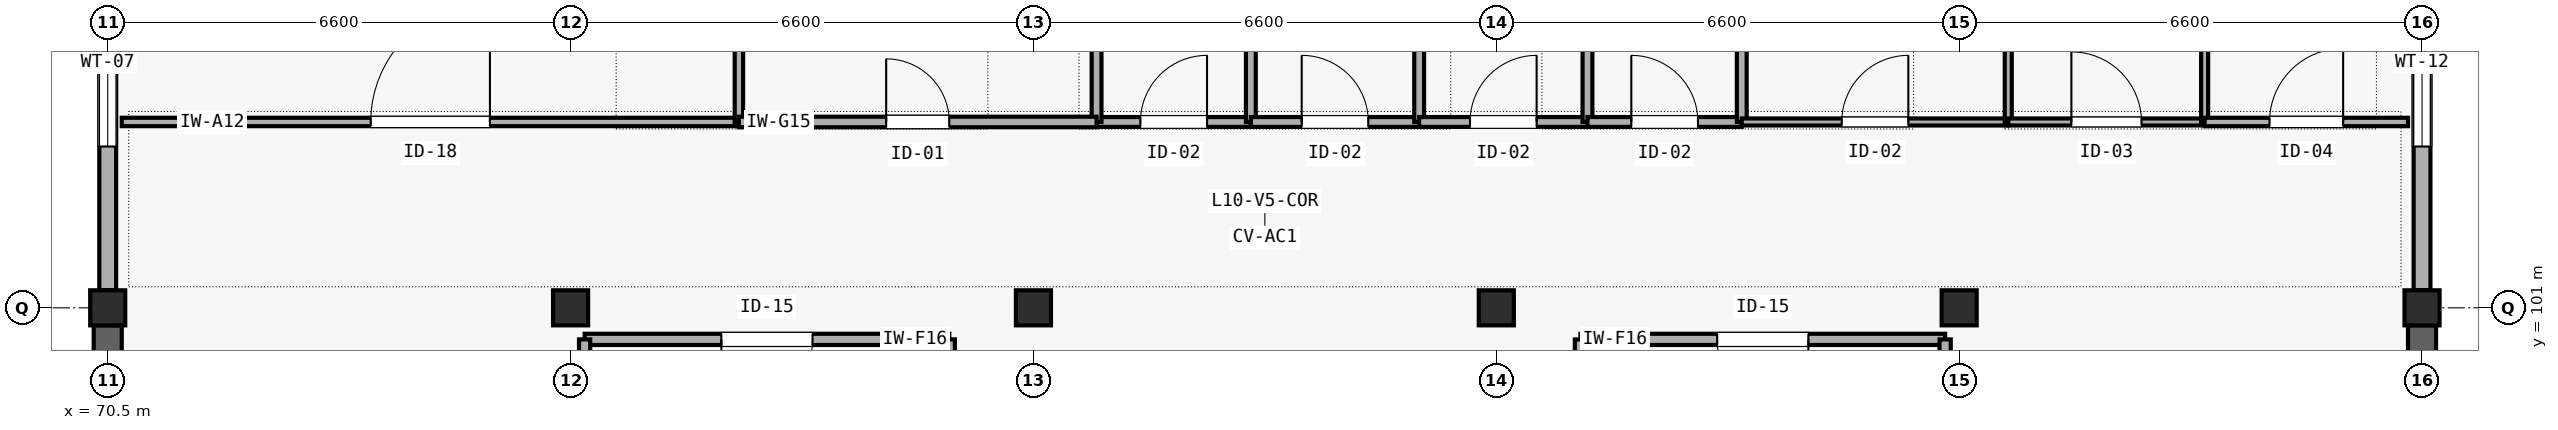
"""IFC4 building model, lengths in metres.
Left out: names, types, materials, properties, quantities, classifications, styles, units other than length and angle.
Written with IfcOpenShell. Run it as: python <this file> out.ifc"""

import sys

from ifc_helpers import new_model, si_unit, direction, frame, frame_2d, origin, origin_2d, place, context, subcontext, project, spatial, rectangle, extrude, element, fill, save


model = new_model("IFC4")
c1 = context("Model", 3, precision=1e-05, world=origin(), true_north=direction((0.0, 1.0)))
c2 = subcontext(c1, "Body", "Model", "MODEL_VIEW")
j1 = project(units=[si_unit("LENGTHUNIT", "METRE"), si_unit("PLANEANGLEUNIT", "RADIAN")], contexts=[c1])
p1 = place(None, origin())
s1 = spatial("IfcSite", under=j1, at=p1, CompositionType="ELEMENT")
p2 = place(p1, origin())
s2 = spatial("IfcBuilding", under=s1, at=p2, CompositionType="ELEMENT")
p3 = place(p2, frame((0.0, 0.0, 42.0)))
s3 = spatial("IfcBuildingStorey", under=s2, at=p3, CompositionType="ELEMENT", Elevation=42.0)
for number, where, z_axis, x_axis in (
    (1, (70.5, 101.0, 0.0), (0.0, 0.0, 1.0), (1.0, 0.0, 0.0)),
    (2, (77.1, 101.0, 0.0), (0.0, 0.0, 1.0), (1.0, 0.0, 0.0)),
    (3, (83.7, 101.0, 0.0), (0.0, 0.0, 1.0), (1.0, 0.0, 0.0)),
    (4, (90.3, 101.0, 0.0), (0.0, 0.0, 1.0), (1.0, 0.0, 0.0)),
    (5, (96.9, 101.0, 0.0), (0.0, 0.0, 1.0), (1.0, 0.0, 0.0)),
    (6, (103.5, 101.0, 0.0), (0.0, 0.0, 1.0), (1.0, 0.0, 0.0)),
):
    element("IfcColumn", number, at=place(p3, frame(where, z_axis=z_axis, x_axis=x_axis)), inside=s3, PredefinedType="COLUMN", context=c2, shape_type="SweptSolid", body=[
        extrude(rectangle(XDim=0.5, YDim=0.5, at=origin_2d()), origin(), (0.0, 0.0, 1.0), 4.2),
    ])
p4 = place(p3, frame((70.5, 97.96, 0.0), z_axis=(0.0, 0.0, 1.0), x_axis=(0.0, 1.0, 0.0)))
e7 = element("IfcWall", 7, at=p4, inside=s3, PredefinedType="SHEAR", context=c2, shape_type="SweptSolid", body=[
    extrude(rectangle(XDim=2.79, YDim=0.4, at=frame_2d((1.395, 0.0))), origin(), (0.0, 0.0, 1.0), 3.85),
])
p5 = place(p3, frame((70.5, 101.25, 0.0), z_axis=(0.0, 0.0, 1.0), x_axis=(0.0, 1.0, 0.0)))
e8 = element("IfcWall", 8, at=p5, inside=s3, PredefinedType="SOLIDWALL", context=c2, shape_type="SweptSolid", body=[
    extrude(rectangle(XDim=6.5, YDim=0.24, at=frame_2d((3.25, 0.0))), origin(), (0.0, 0.0, 1.0), 3.565),
])
p6 = place(p5, frame((2.05, 0.0, 0.85)))
e9 = element("IfcOpeningElement", 9, at=p6, cuts=e8, PredefinedType="OPENING", context=c2, shape_type="SweptSolid", body=[
    extrude(rectangle(XDim=2.4, YDim=1.35, at=frame_2d((1.2, 0.675))), frame((0.0, 0.13, 0.0), z_axis=(0.0, -1.0, 0.0), x_axis=(1.0, 0.0, 0.0)), (0.0, 0.0, 1.0), 0.26),
])
p7 = place(p3, frame((103.5, 97.96, 0.0), z_axis=(0.0, 0.0, 1.0), x_axis=(0.0, 1.0, 0.0)))
e10 = element("IfcWall", 10, at=p7, inside=s3, PredefinedType="SHEAR", context=c2, shape_type="SweptSolid", body=[
    extrude(rectangle(XDim=2.79, YDim=0.4, at=frame_2d((1.395, 0.0))), origin(), (0.0, 0.0, 1.0), 3.85),
])
p8 = place(p3, frame((103.5, 101.25, 0.0), z_axis=(0.0, 0.0, 1.0), x_axis=(0.0, 1.0, 0.0)))
e11 = element("IfcWall", 11, at=p8, inside=s3, PredefinedType="SOLIDWALL", context=c2, shape_type="SweptSolid", body=[
    extrude(rectangle(XDim=6.5, YDim=0.24, at=frame_2d((3.25, 0.0))), origin(), (0.0, 0.0, 1.0), 3.505),
])
p9 = place(p8, frame((2.05, 0.0, 0.85)))
e12 = element("IfcOpeningElement", 12, at=p9, cuts=e11, PredefinedType="OPENING", context=c2, shape_type="SweptSolid", body=[
    extrude(rectangle(XDim=2.4, YDim=1.5, at=frame_2d((1.2, 0.75))), frame((0.0, 0.13, 0.0), z_axis=(0.0, -1.0, 0.0), x_axis=(1.0, 0.0, 0.0)), (0.0, 0.0, 1.0), 0.26),
])
p10 = place(p3, frame((77.3, 100.55, 0.0), z_axis=(0.0, 0.0, 1.0), x_axis=(1.0, 0.0, 0.0)))
e13 = element("IfcWall", 13, at=p10, inside=s3, PredefinedType="SOLIDWALL", context=c2, shape_type="SweptSolid", body=[
    extrude(rectangle(XDim=5.2, YDim=0.16, at=frame_2d((2.6, 0.0))), origin(), (0.0, 0.0, 1.0), 3.9),
])
p11 = place(p10, frame((1.95, 0.0, 0.0)))
e14 = element("IfcOpeningElement", 14, at=p11, cuts=e13, PredefinedType="OPENING", context=c2, shape_type="SweptSolid", body=[
    extrude(rectangle(XDim=1.3, YDim=2.15, at=frame_2d((0.65, 1.075))), frame((0.0, 0.09, 0.0), z_axis=(0.0, -1.0, 0.0), x_axis=(1.0, 0.0, 0.0)), (0.0, 0.0, 1.0), 0.18),
])
p12 = place(p3, frame((77.3, 97.5, 0.0), z_axis=(0.0, 0.0, 1.0), x_axis=(0.0, 1.0, 0.0)))
e15 = element("IfcWall", 15, at=p12, inside=s3, PredefinedType="SOLIDWALL", context=c2, shape_type="SweptSolid", body=[
    extrude(rectangle(XDim=3.05, YDim=0.16, at=frame_2d((1.525, 0.0))), origin(), (0.0, 0.0, 1.0), 3.405),
])
p13 = place(p3, frame((82.5, 97.5, 0.0), z_axis=(0.0, 0.0, 1.0), x_axis=(0.0, 1.0, 0.0)))
e16 = element("IfcWall", 16, at=p13, inside=s3, PredefinedType="SOLIDWALL", context=c2, shape_type="SweptSolid", body=[
    extrude(rectangle(XDim=3.05, YDim=0.16, at=frame_2d((1.525, 0.0))), origin(), (0.0, 0.0, 1.0), 3.9),
])
p14 = place(p3, frame((91.5, 100.55, 0.0), z_axis=(0.0, 0.0, 1.0), x_axis=(1.0, 0.0, 0.0)))
e17 = element("IfcWall", 17, at=p14, inside=s3, PredefinedType="SOLIDWALL", context=c2, shape_type="SweptSolid", body=[
    extrude(rectangle(XDim=5.2, YDim=0.16, at=frame_2d((2.6, 0.0))), origin(), (0.0, 0.0, 1.0), 3.9),
])
p15 = place(p14, frame((1.95, 0.0, 0.0)))
e18 = element("IfcOpeningElement", 18, at=p15, cuts=e17, PredefinedType="OPENING", context=c2, shape_type="SweptSolid", body=[
    extrude(rectangle(XDim=1.3, YDim=2.15, at=frame_2d((0.65, 1.075))), frame((0.0, 0.09, 0.0), z_axis=(0.0, -1.0, 0.0), x_axis=(1.0, 0.0, 0.0)), (0.0, 0.0, 1.0), 0.18),
])
p16 = place(p3, frame((91.5, 97.5, 0.0), z_axis=(0.0, 0.0, 1.0), x_axis=(0.0, 1.0, 0.0)))
e19 = element("IfcWall", 19, at=p16, inside=s3, PredefinedType="SOLIDWALL", context=c2, shape_type="SweptSolid", body=[
    extrude(rectangle(XDim=3.05, YDim=0.16, at=frame_2d((1.525, 0.0))), origin(), (0.0, 0.0, 1.0), 3.9),
])
p17 = place(p3, frame((96.7, 97.5, 0.0), z_axis=(0.0, 0.0, 1.0), x_axis=(0.0, 1.0, 0.0)))
e20 = element("IfcWall", 20, at=p17, inside=s3, PredefinedType="SOLIDWALL", context=c2, shape_type="SweptSolid", body=[
    extrude(rectangle(XDim=3.05, YDim=0.16, at=frame_2d((1.525, 0.0))), origin(), (0.0, 0.0, 1.0), 3.405),
])
p18 = place(p3, frame((84.6, 103.65, 0.0), z_axis=(0.0, 0.0, 1.0), x_axis=(1.0, 0.0, 0.0)))
e21 = element("IfcWall", 21, at=p18, inside=s3, PredefinedType="PLUMBINGWALL", context=c2, shape_type="SweptSolid", body=[
    extrude(rectangle(XDim=2.2, YDim=0.14, at=frame_2d((1.1, 0.0))), origin(), (0.0, 0.0, 1.0), 3.9),
])
p19 = place(p18, frame((0.625, 0.0, 0.0)))
e22 = element("IfcOpeningElement", 22, at=p19, cuts=e21, PredefinedType="OPENING", context=c2, shape_type="SweptSolid", body=[
    extrude(rectangle(XDim=0.95, YDim=2.1, at=frame_2d((0.475, 1.05))), frame((0.0, 0.08, 0.0), z_axis=(0.0, -1.0, 0.0), x_axis=(1.0, 0.0, 0.0)), (0.0, 0.0, 1.0), 0.16),
])
for number, where, z_axis, x_axis in (
    (23, (84.6, 103.65, 0.0), (0.0, 0.0, 1.0), (0.0, 1.0, 0.0)),
    (24, (86.8, 103.65, 0.0), (0.0, 0.0, 1.0), (0.0, 1.0, 0.0)),
):
    element("IfcWall", number, at=place(p3, frame(where, z_axis=z_axis, x_axis=x_axis)), inside=s3, PredefinedType="PLUMBINGWALL", context=c2, shape_type="SweptSolid", body=[
        extrude(rectangle(XDim=4.15, YDim=0.14, at=frame_2d((2.075, 0.0))), origin(), (0.0, 0.0, 1.0), 3.9),
    ])
p20 = place(p3, frame((86.8, 103.65, 0.0), z_axis=(0.0, 0.0, 1.0), x_axis=(1.0, 0.0, 0.0)))
e25 = element("IfcWall", 25, at=p20, inside=s3, PredefinedType="PLUMBINGWALL", context=c2, shape_type="SweptSolid", body=[
    extrude(rectangle(XDim=2.4, YDim=0.14, at=frame_2d((1.2, 0.0))), origin(), (0.0, 0.0, 1.0), 3.9),
])
p21 = place(p20, frame((0.725, 0.0, 0.0)))
e26 = element("IfcOpeningElement", 26, at=p21, cuts=e25, PredefinedType="OPENING", context=c2, shape_type="SweptSolid", body=[
    extrude(rectangle(XDim=0.95, YDim=2.1, at=frame_2d((0.475, 1.05))), frame((0.0, 0.08, 0.0), z_axis=(0.0, -1.0, 0.0), x_axis=(1.0, 0.0, 0.0)), (0.0, 0.0, 1.0), 0.16),
])
p22 = place(p3, frame((89.2, 103.65, 0.0), z_axis=(0.0, 0.0, 1.0), x_axis=(0.0, 1.0, 0.0)))
e27 = element("IfcWall", 27, at=p22, inside=s3, PredefinedType="PLUMBINGWALL", context=c2, shape_type="SweptSolid", body=[
    extrude(rectangle(XDim=4.15, YDim=0.14, at=frame_2d((2.075, 0.0))), origin(), (0.0, 0.0, 1.0), 3.9),
])
p23 = place(p3, frame((89.2, 103.65, 0.0), z_axis=(0.0, 0.0, 1.0), x_axis=(1.0, 0.0, 0.0)))
e28 = element("IfcWall", 28, at=p23, inside=s3, PredefinedType="PLUMBINGWALL", context=c2, shape_type="SweptSolid", body=[
    extrude(rectangle(XDim=2.4, YDim=0.14, at=frame_2d((1.2, 0.0))), origin(), (0.0, 0.0, 1.0), 3.9),
])
p24 = place(p23, frame((0.725, 0.0, 0.0)))
e29 = element("IfcOpeningElement", 29, at=p24, cuts=e28, PredefinedType="OPENING", context=c2, shape_type="SweptSolid", body=[
    extrude(rectangle(XDim=0.95, YDim=2.1, at=frame_2d((0.475, 1.05))), frame((0.0, 0.08, 0.0), z_axis=(0.0, -1.0, 0.0), x_axis=(1.0, 0.0, 0.0)), (0.0, 0.0, 1.0), 0.16),
])
p25 = place(p3, frame((91.6, 103.65, 0.0), z_axis=(0.0, 0.0, 1.0), x_axis=(0.0, 1.0, 0.0)))
e30 = element("IfcWall", 30, at=p25, inside=s3, PredefinedType="PLUMBINGWALL", context=c2, shape_type="SweptSolid", body=[
    extrude(rectangle(XDim=4.15, YDim=0.14, at=frame_2d((2.075, 0.0))), origin(), (0.0, 0.0, 1.0), 3.9),
])
p26 = place(p3, frame((91.6, 103.65, 0.0), z_axis=(0.0, 0.0, 1.0), x_axis=(1.0, 0.0, 0.0)))
e31 = element("IfcWall", 31, at=p26, inside=s3, PredefinedType="PLUMBINGWALL", context=c2, shape_type="SweptSolid", body=[
    extrude(rectangle(XDim=2.2, YDim=0.14, at=frame_2d((1.1, 0.0))), origin(), (0.0, 0.0, 1.0), 3.9),
])
p27 = place(p26, frame((0.625, 0.0, 0.0)))
e32 = element("IfcOpeningElement", 32, at=p27, cuts=e31, PredefinedType="OPENING", context=c2, shape_type="SweptSolid", body=[
    extrude(rectangle(XDim=0.95, YDim=2.1, at=frame_2d((0.475, 1.05))), frame((0.0, 0.08, 0.0), z_axis=(0.0, -1.0, 0.0), x_axis=(1.0, 0.0, 0.0)), (0.0, 0.0, 1.0), 0.16),
])
p28 = place(p3, frame((93.8, 103.65, 0.0), z_axis=(0.0, 0.0, 1.0), x_axis=(0.0, 1.0, 0.0)))
e33 = element("IfcWall", 33, at=p28, inside=s3, PredefinedType="PLUMBINGWALL", context=c2, shape_type="SweptSolid", body=[
    extrude(rectangle(XDim=4.15, YDim=0.14, at=frame_2d((2.075, 0.0))), origin(), (0.0, 0.0, 1.0), 3.9),
])
p29 = place(p3, frame((70.7, 103.65, 0.0), z_axis=(0.0, 0.0, 1.0), x_axis=(1.0, 0.0, 0.0)))
e34 = element("IfcWall", 34, at=p29, inside=s3, PredefinedType="PARTITIONING", context=c2, shape_type="SweptSolid", body=[
    extrude(rectangle(XDim=8.8, YDim=0.12, at=frame_2d((4.4, 0.0))), origin(), (0.0, 0.0, 1.0), 3.9),
])
p30 = place(p29, frame((3.55, 0.0, 0.0)))
e35 = element("IfcOpeningElement", 35, at=p30, cuts=e34, PredefinedType="OPENING", context=c2, shape_type="SweptSolid", body=[
    extrude(rectangle(XDim=1.7, YDim=2.2, at=frame_2d((0.85, 1.1))), frame((0.0, 0.07, 0.0), z_axis=(0.0, -1.0, 0.0), x_axis=(1.0, 0.0, 0.0)), (0.0, 0.0, 1.0), 0.14),
])
p31 = place(p3, frame((79.5, 103.65, 0.0), z_axis=(0.0, 0.0, 1.0), x_axis=(0.0, 1.0, 0.0)))
e36 = element("IfcWall", 36, at=p31, inside=s3, PredefinedType="PARTITIONING", context=c2, shape_type="SweptSolid", body=[
    extrude(rectangle(XDim=11.15, YDim=0.12, at=frame_2d((5.575, 0.0))), origin(), (0.0, 0.0, 1.0), 3.577),
])
p32 = place(p3, frame((79.5, 103.65, 0.0), z_axis=(0.0, 0.0, 1.0), x_axis=(1.0, 0.0, 0.0)))
e37 = element("IfcWall", 37, at=p32, inside=s3, PredefinedType="PARTITIONING", context=c2, shape_type="SweptSolid", body=[
    extrude(rectangle(XDim=5.1, YDim=0.15, at=frame_2d((2.55, 0.0))), origin(), (0.0, 0.0, 1.0), 3.9),
])
p33 = place(p32, frame((2.1, 0.0, 0.0)))
e38 = element("IfcOpeningElement", 38, at=p33, cuts=e37, PredefinedType="OPENING", context=c2, shape_type="SweptSolid", body=[
    extrude(rectangle(XDim=0.9, YDim=2.1, at=frame_2d((0.45, 1.05))), frame((0.0, 0.085, 0.0), z_axis=(0.0, -1.0, 0.0), x_axis=(1.0, 0.0, 0.0)), (0.0, 0.0, 1.0), 0.17),
])
p34 = place(p3, frame((93.8, 103.65, 0.0), z_axis=(0.0, 0.0, 1.0), x_axis=(1.0, 0.0, 0.0)))
e39 = element("IfcWall", 39, at=p34, inside=s3, PredefinedType="PARTITIONING", context=c2, shape_type="SweptSolid", body=[
    extrude(rectangle(XDim=3.8, YDim=0.1, at=frame_2d((1.9, 0.0))), origin(), (0.0, 0.0, 1.0), 3.9),
])
p35 = place(p34, frame((1.425, 0.0, 0.0)))
e40 = element("IfcOpeningElement", 40, at=p35, cuts=e39, PredefinedType="OPENING", context=c2, shape_type="SweptSolid", body=[
    extrude(rectangle(XDim=0.95, YDim=2.1, at=frame_2d((0.475, 1.05))), frame((0.0, 0.06, 0.0), z_axis=(0.0, -1.0, 0.0), x_axis=(1.0, 0.0, 0.0)), (0.0, 0.0, 1.0), 0.12),
])
p36 = place(p3, frame((97.6, 103.65, 0.0), z_axis=(0.0, 0.0, 1.0), x_axis=(0.0, 1.0, 0.0)))
e41 = element("IfcWall", 41, at=p36, inside=s3, PredefinedType="PARTITIONING", context=c2, shape_type="SweptSolid", body=[
    extrude(rectangle(XDim=11.15, YDim=0.1, at=frame_2d((5.575, 0.0))), origin(), (0.0, 0.0, 1.0), 3.9),
])
p37 = place(p3, frame((97.6, 103.65, 0.0), z_axis=(0.0, 0.0, 1.0), x_axis=(1.0, 0.0, 0.0)))
e42 = element("IfcWall", 42, at=p37, inside=s3, PredefinedType="PARTITIONING", context=c2, shape_type="SweptSolid", body=[
    extrude(rectangle(XDim=2.8, YDim=0.1, at=frame_2d((1.4, 0.0))), origin(), (0.0, 0.0, 1.0), 3.9),
])
p38 = place(p37, frame((0.9, 0.0, 0.0)))
e43 = element("IfcOpeningElement", 43, at=p38, cuts=e42, PredefinedType="OPENING", context=c2, shape_type="SweptSolid", body=[
    extrude(rectangle(XDim=1.0, YDim=2.1, at=frame_2d((0.5, 1.05))), frame((0.0, 0.06, 0.0), z_axis=(0.0, -1.0, 0.0), x_axis=(1.0, 0.0, 0.0)), (0.0, 0.0, 1.0), 0.12),
])
p39 = place(p3, frame((100.4, 103.65, 0.0), z_axis=(0.0, 0.0, 1.0), x_axis=(0.0, 1.0, 0.0)))
e44 = element("IfcWall", 44, at=p39, inside=s3, PredefinedType="PARTITIONING", context=c2, shape_type="SweptSolid", body=[
    extrude(rectangle(XDim=11.15, YDim=0.1, at=frame_2d((5.575, 0.0))), origin(), (0.0, 0.0, 1.0), 3.9),
])
p40 = place(p3, frame((100.4, 103.65, 0.0), z_axis=(0.0, 0.0, 1.0), x_axis=(1.0, 0.0, 0.0)))
e45 = element("IfcWall", 45, at=p40, inside=s3, PredefinedType="PARTITIONING", context=c2, shape_type="SweptSolid", body=[
    extrude(rectangle(XDim=2.9, YDim=0.12, at=frame_2d((1.45, 0.0))), origin(), (0.0, 0.0, 1.0), 3.9),
])
p41 = place(p40, frame((0.925, 0.0, 0.0)))
e46 = element("IfcOpeningElement", 46, at=p41, cuts=e45, PredefinedType="OPENING", context=c2, shape_type="SweptSolid", body=[
    extrude(rectangle(XDim=1.05, YDim=2.15, at=frame_2d((0.525, 1.075))), frame((0.0, 0.07, 0.0), z_axis=(0.0, -1.0, 0.0), x_axis=(1.0, 0.0, 0.0)), (0.0, 0.0, 1.0), 0.14),
])
p42 = place(p6, origin())
e47 = element("IfcWindow", 47, at=p42, inside=s3, PartitioningType="SINGLE_PANEL", PredefinedType="WINDOW", context=c2, shape_type="SweptSolid", body=[
    extrude(rectangle(XDim=2.4, YDim=1.35, at=frame_2d((1.2, 0.675))), frame((0.0, 0.03, 0.0), z_axis=(0.0, -1.0, 0.0), x_axis=(1.0, 0.0, 0.0)), (0.0, 0.0, 1.0), 0.06),
])
fill(e9, e47)
p43 = place(p9, origin())
e48 = element("IfcWindow", 48, at=p43, inside=s3, PartitioningType="SINGLE_PANEL", PredefinedType="WINDOW", context=c2, shape_type="SweptSolid", body=[
    extrude(rectangle(XDim=2.4, YDim=1.5, at=frame_2d((1.2, 0.75))), frame((0.0, 0.03, 0.0), z_axis=(0.0, -1.0, 0.0), x_axis=(1.0, 0.0, 0.0)), (0.0, 0.0, 1.0), 0.06),
])
fill(e12, e48)
p44 = place(p11, frame((1.3, 0.0, 0.0), z_axis=(0.0, 0.0, 1.0), x_axis=(-1.0, 0.0, 0.0)))
e49 = element("IfcDoor", 49, at=p44, inside=s3, OperationType="SINGLE_SWING_RIGHT", PredefinedType="DOOR", context=c2, shape_type="SweptSolid", body=[
    extrude(rectangle(XDim=1.3, YDim=2.15, at=frame_2d((0.65, 1.075))), frame((0.0, 0.025, 0.0), z_axis=(0.0, -1.0, 0.0), x_axis=(1.0, 0.0, 0.0)), (0.0, 0.0, 1.0), 0.05),
])
fill(e14, e49)
p45 = place(p15, frame((1.3, 0.0, 0.0), z_axis=(0.0, 0.0, 1.0), x_axis=(-1.0, 0.0, 0.0)))
e50 = element("IfcDoor", 50, at=p45, inside=s3, OperationType="SINGLE_SWING_LEFT", PredefinedType="DOOR", context=c2, shape_type="SweptSolid", body=[
    extrude(rectangle(XDim=1.3, YDim=2.15, at=frame_2d((0.65, 1.075))), frame((0.0, 0.025, 0.0), z_axis=(0.0, -1.0, 0.0), x_axis=(1.0, 0.0, 0.0)), (0.0, 0.0, 1.0), 0.05),
])
fill(e18, e50)
p46 = place(p19, origin())
e51 = element("IfcDoor", 51, at=p46, inside=s3, OperationType="SINGLE_SWING_RIGHT", PredefinedType="DOOR", context=c2, shape_type="SweptSolid", body=[
    extrude(rectangle(XDim=0.95, YDim=2.1, at=frame_2d((0.475, 1.05))), frame((0.0, 0.025, 0.0), z_axis=(0.0, -1.0, 0.0), x_axis=(1.0, 0.0, 0.0)), (0.0, 0.0, 1.0), 0.05),
])
fill(e22, e51)
p47 = place(p21, origin())
e52 = element("IfcDoor", 52, at=p47, inside=s3, OperationType="SINGLE_SWING_LEFT", PredefinedType="DOOR", context=c2, shape_type="SweptSolid", body=[
    extrude(rectangle(XDim=0.95, YDim=2.1, at=frame_2d((0.475, 1.05))), frame((0.0, 0.025, 0.0), z_axis=(0.0, -1.0, 0.0), x_axis=(1.0, 0.0, 0.0)), (0.0, 0.0, 1.0), 0.05),
])
fill(e26, e52)
p48 = place(p24, origin())
e53 = element("IfcDoor", 53, at=p48, inside=s3, OperationType="SINGLE_SWING_RIGHT", PredefinedType="DOOR", context=c2, shape_type="SweptSolid", body=[
    extrude(rectangle(XDim=0.95, YDim=2.1, at=frame_2d((0.475, 1.05))), frame((0.0, 0.025, 0.0), z_axis=(0.0, -1.0, 0.0), x_axis=(1.0, 0.0, 0.0)), (0.0, 0.0, 1.0), 0.05),
])
fill(e29, e53)
p49 = place(p27, origin())
e54 = element("IfcDoor", 54, at=p49, inside=s3, OperationType="SINGLE_SWING_LEFT", PredefinedType="DOOR", context=c2, shape_type="SweptSolid", body=[
    extrude(rectangle(XDim=0.95, YDim=2.1, at=frame_2d((0.475, 1.05))), frame((0.0, 0.025, 0.0), z_axis=(0.0, -1.0, 0.0), x_axis=(1.0, 0.0, 0.0)), (0.0, 0.0, 1.0), 0.05),
])
fill(e32, e54)
p50 = place(p30, origin())
e55 = element("IfcDoor", 55, at=p50, inside=s3, OperationType="SINGLE_SWING_RIGHT", PredefinedType="DOOR", context=c2, shape_type="SweptSolid", body=[
    extrude(rectangle(XDim=1.7, YDim=2.2, at=frame_2d((0.85, 1.1))), frame((0.0, 0.025, 0.0), z_axis=(0.0, -1.0, 0.0), x_axis=(1.0, 0.0, 0.0)), (0.0, 0.0, 1.0), 0.05),
])
fill(e35, e55)
p51 = place(p33, origin())
e56 = element("IfcDoor", 56, at=p51, inside=s3, OperationType="SINGLE_SWING_LEFT", PredefinedType="DOOR", context=c2, shape_type="SweptSolid", body=[
    extrude(rectangle(XDim=0.9, YDim=2.1, at=frame_2d((0.45, 1.05))), frame((0.0, 0.025, 0.0), z_axis=(0.0, -1.0, 0.0), x_axis=(1.0, 0.0, 0.0)), (0.0, 0.0, 1.0), 0.05),
])
fill(e38, e56)
p52 = place(p35, origin())
e57 = element("IfcDoor", 57, at=p52, inside=s3, OperationType="SINGLE_SWING_RIGHT", PredefinedType="DOOR", context=c2, shape_type="SweptSolid", body=[
    extrude(rectangle(XDim=0.95, YDim=2.1, at=frame_2d((0.475, 1.05))), frame((0.0, 0.025, 0.0), z_axis=(0.0, -1.0, 0.0), x_axis=(1.0, 0.0, 0.0)), (0.0, 0.0, 1.0), 0.05),
])
fill(e40, e57)
p53 = place(p38, origin())
e58 = element("IfcDoor", 58, at=p53, inside=s3, OperationType="SINGLE_SWING_LEFT", PredefinedType="DOOR", context=c2, shape_type="SweptSolid", body=[
    extrude(rectangle(XDim=1.0, YDim=2.1, at=frame_2d((0.5, 1.05))), frame((0.0, 0.025, 0.0), z_axis=(0.0, -1.0, 0.0), x_axis=(1.0, 0.0, 0.0)), (0.0, 0.0, 1.0), 0.05),
])
fill(e43, e58)
p54 = place(p41, origin())
e59 = element("IfcDoor", 59, at=p54, inside=s3, OperationType="SINGLE_SWING_RIGHT", PredefinedType="DOOR", context=c2, shape_type="SweptSolid", body=[
    extrude(rectangle(XDim=1.05, YDim=2.15, at=frame_2d((0.525, 1.075))), frame((0.0, 0.025, 0.0), z_axis=(0.0, -1.0, 0.0), x_axis=(1.0, 0.0, 0.0)), (0.0, 0.0, 1.0), 0.05),
])
fill(e46, e59)
save(model, sys.argv[1])
